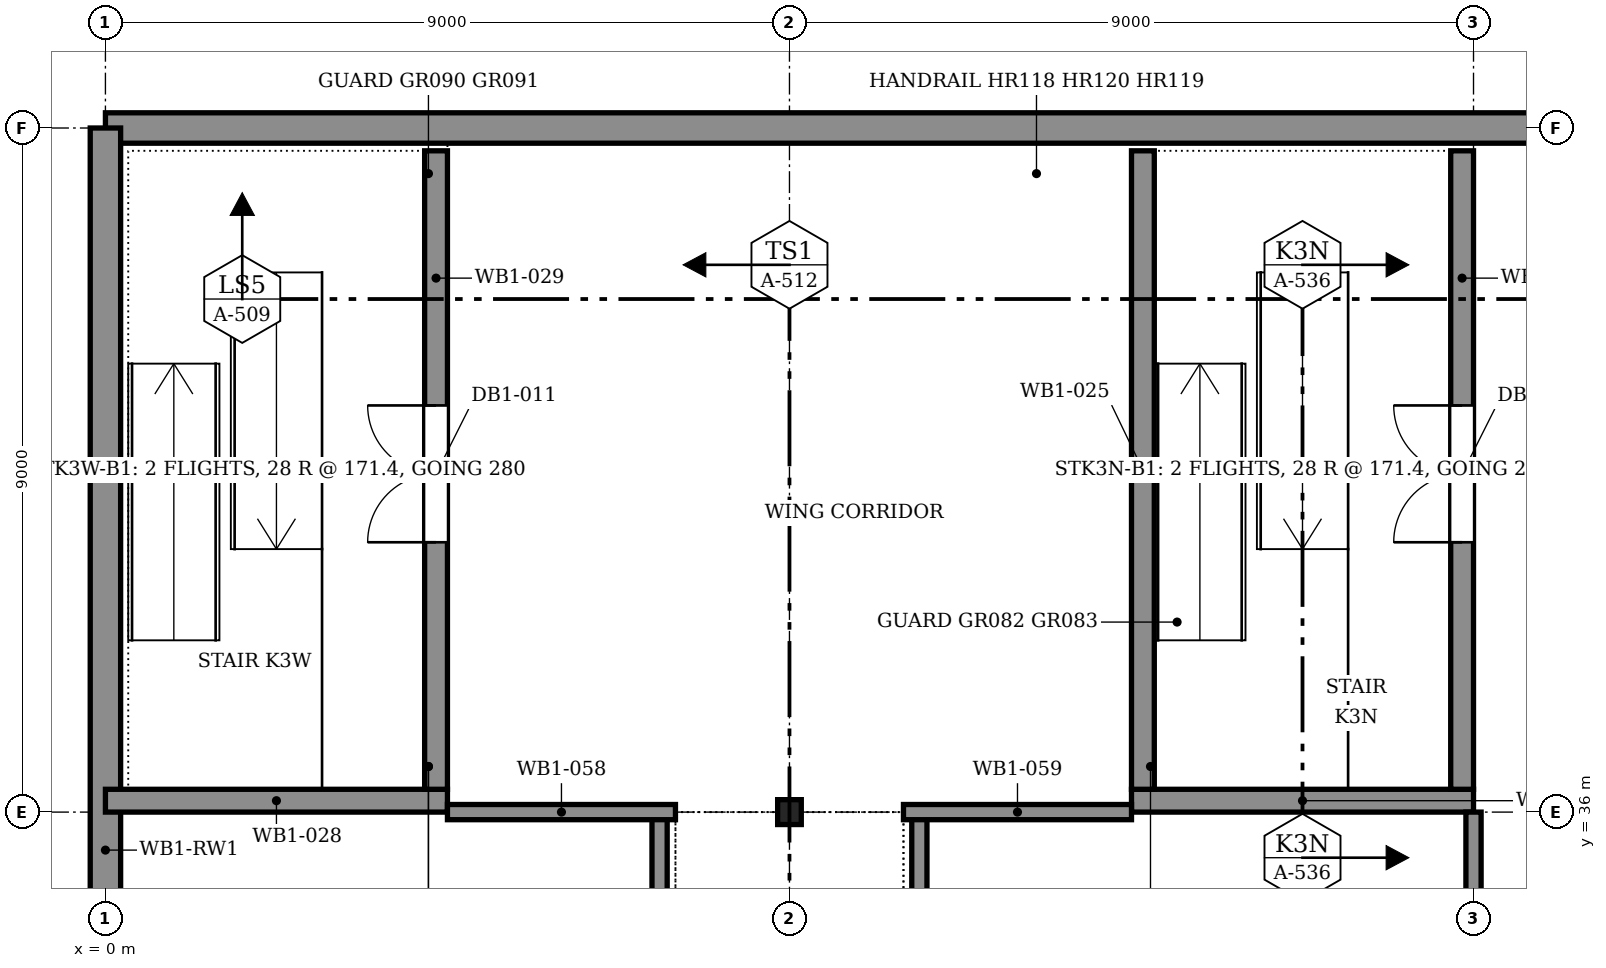
"""IFC4 building model, lengths in metres.
Left out: names, types, materials, properties, quantities, classifications, styles, units other than length and angle.
Written with IfcOpenShell. Run it as: python <this file> out.ifc"""

import sys

from ifc_helpers import new_model, si_unit, direction, frame, frame_2d, origin, origin_2d, place, context, subcontext, project, spatial, rectangle, i_section, extrude, element, fill, save


model = new_model("IFC4")
c1 = context("Model", 3, precision=1e-05, world=origin(), true_north=direction((0.0, 1.0)))
c2 = subcontext(c1, "Body", "Model", "MODEL_VIEW")
j1 = project(units=[si_unit("LENGTHUNIT", "METRE"), si_unit("PLANEANGLEUNIT", "RADIAN")], contexts=[c1])
p1 = place(None, origin())
s1 = spatial("IfcSite", under=j1, at=p1, CompositionType="ELEMENT")
p2 = place(p1, origin())
s2 = spatial("IfcBuilding", under=s1, at=p2, CompositionType="ELEMENT")
p3 = place(p2, frame((0.0, 0.0, -4.8)))
s3 = spatial("IfcBuildingStorey", under=s2, at=p3, CompositionType="ELEMENT", Elevation=-4.8)
p4 = place(p3, frame((0.0, 45.0, 0.0), z_axis=(0.0, 0.0, 1.0), x_axis=(1.0, 0.0, 0.0)))
e1 = element("IfcWall", 1, at=p4, inside=s3, PredefinedType="SOLIDWALL", context=c2, shape_type="SweptSolid", body=[
    extrude(rectangle(XDim=72.0, YDim=0.4, at=frame_2d((36.0, 0.0))), origin(), (0.0, 0.0, 1.0), 4.8),
])
p5 = place(p3, frame((0.0, 0.0, 0.0), z_axis=(0.0, 0.0, 1.0), x_axis=(0.0, 1.0, 0.0)))
e2 = element("IfcWall", 2, at=p5, inside=s3, PredefinedType="SOLIDWALL", context=c2, shape_type="SweptSolid", body=[
    extrude(rectangle(XDim=45.0, YDim=0.4, at=frame_2d((22.5, 0.0))), origin(), (0.0, 0.0, 1.0), 4.8),
])
p6 = place(p3, frame((9.0, 36.0, 0.0), z_axis=(0.0, 0.0, 1.0), x_axis=(1.0, 0.0, 0.0)))
e3 = element("IfcColumn", 3, at=p6, inside=s3, PredefinedType="COLUMN", context=c2, shape_type="SweptSolid", body=[
    extrude(i_section(OverallWidth=0.311, OverallDepth=0.327, WebThickness=0.016, FlangeThickness=0.025, FilletRadius=0.017, at=origin_2d()), origin(), (0.0, 0.0, 1.0), 1.19),
])
p7 = place(p3, frame((13.5, 36.15, 0.0), z_axis=(0.0, 0.0, 1.0), x_axis=(1.0, 0.0, 0.0)))
e4 = element("IfcWall", 4, at=p7, inside=s3, PredefinedType="SOLIDWALL", context=c2, shape_type="SweptSolid", body=[
    extrude(rectangle(XDim=4.5, YDim=0.3, at=frame_2d((2.25, 0.0))), origin(), (0.0, 0.0, 1.0), 4.8),
])
p8 = place(p3, frame((17.85, 36.3, 0.0), z_axis=(0.0, 0.0, 1.0), x_axis=(0.0, 1.0, 0.0)))
e5 = element("IfcWall", 5, at=p8, inside=s3, PredefinedType="SOLIDWALL", context=c2, shape_type="SweptSolid", body=[
    extrude(rectangle(XDim=8.4, YDim=0.3, at=frame_2d((4.2, 0.0))), origin(), (0.0, 0.0, 1.0), 4.8),
])
p9 = place(p8, frame((3.25, 0.0, 0.0)))
e6 = element("IfcOpeningElement", 6, at=p9, cuts=e5, PredefinedType="OPENING", context=c2, shape_type="SweptSolid", body=[
    extrude(rectangle(XDim=1.8, YDim=2.1, at=frame_2d((0.9, 1.05))), frame((0.0, 0.16, 0.0), z_axis=(0.0, -1.0, 0.0), x_axis=(1.0, 0.0, 0.0)), (0.0, 0.0, 1.0), 0.32),
])
p10 = place(p3, frame((13.65, 36.3, 0.0), z_axis=(0.0, 0.0, 1.0), x_axis=(0.0, 1.0, 0.0)))
e7 = element("IfcWall", 7, at=p10, inside=s3, PredefinedType="SOLIDWALL", context=c2, shape_type="SweptSolid", body=[
    extrude(rectangle(XDim=8.4, YDim=0.3, at=frame_2d((4.2, 0.0))), origin(), (0.0, 0.0, 1.0), 4.8),
])
p11 = place(p3, frame((0.0, 36.15, 0.0), z_axis=(0.0, 0.0, 1.0), x_axis=(1.0, 0.0, 0.0)))
e8 = element("IfcWall", 8, at=p11, inside=s3, PredefinedType="SOLIDWALL", context=c2, shape_type="SweptSolid", body=[
    extrude(rectangle(XDim=4.5, YDim=0.3, at=frame_2d((2.25, 0.0))), origin(), (0.0, 0.0, 1.0), 4.8),
])
p12 = place(p3, frame((4.35, 36.3, 0.0), z_axis=(0.0, 0.0, 1.0), x_axis=(0.0, 1.0, 0.0)))
e9 = element("IfcWall", 9, at=p12, inside=s3, PredefinedType="SOLIDWALL", context=c2, shape_type="SweptSolid", body=[
    extrude(rectangle(XDim=8.4, YDim=0.3, at=frame_2d((4.2, 0.0))), origin(), (0.0, 0.0, 1.0), 4.8),
])
p13 = place(p12, frame((3.25, 0.0, 0.0)))
e10 = element("IfcOpeningElement", 10, at=p13, cuts=e9, PredefinedType="OPENING", context=c2, shape_type="SweptSolid", body=[
    extrude(rectangle(XDim=1.8, YDim=2.1, at=frame_2d((0.9, 1.05))), frame((0.0, 0.16, 0.0), z_axis=(0.0, -1.0, 0.0), x_axis=(1.0, 0.0, 0.0)), (0.0, 0.0, 1.0), 0.32),
])
p14 = place(p3, frame((7.291, 18.0, 0.0), z_axis=(0.0, 0.0, 1.0), x_axis=(0.0, 1.0, 0.0)))
e11 = element("IfcWall", 11, at=p14, inside=s3, PredefinedType="PARTITIONING", context=c2, shape_type="SweptSolid", body=[
    extrude(rectangle(XDim=18.0, YDim=0.2, at=frame_2d((9.0, 0.0))), origin(), (0.0, 0.0, 1.0), 2.6),
])
p15 = place(p14, frame((8.51, 0.0, 0.0)))
e12 = element("IfcOpeningElement", 12, at=p15, cuts=e11, PredefinedType="OPENING", context=c2, shape_type="SweptSolid", body=[
    extrude(rectangle(XDim=1.0, YDim=2.1, at=frame_2d((0.5, 1.05))), frame((0.0, 0.11, 0.0), z_axis=(0.0, -1.0, 0.0), x_axis=(1.0, 0.0, 0.0)), (0.0, 0.0, 1.0), 0.22),
])
p16 = place(p3, frame((10.709, 18.0, 0.0), z_axis=(0.0, 0.0, 1.0), x_axis=(0.0, 1.0, 0.0)))
e13 = element("IfcWall", 13, at=p16, inside=s3, PredefinedType="PARTITIONING", context=c2, shape_type="SweptSolid", body=[
    extrude(rectangle(XDim=18.0, YDim=0.2, at=frame_2d((9.0, 0.0))), origin(), (0.0, 0.0, 1.0), 2.6),
])
p17 = place(p16, frame((8.51, 0.0, 0.0)))
e14 = element("IfcOpeningElement", 14, at=p17, cuts=e13, PredefinedType="OPENING", context=c2, shape_type="SweptSolid", body=[
    extrude(rectangle(XDim=1.0, YDim=2.1, at=frame_2d((0.5, 1.05))), frame((0.0, 0.11, 0.0), z_axis=(0.0, -1.0, 0.0), x_axis=(1.0, 0.0, 0.0)), (0.0, 0.0, 1.0), 0.22),
])
for number, where, z_axis, x_axis in (
    (15, (4.5, 36.0, 0.0), (0.0, 0.0, 1.0), (1.0, 0.0, 0.0)),
    (16, (10.5, 36.0, 0.0), (0.0, 0.0, 1.0), (1.0, 0.0, 0.0)),
):
    element("IfcWall", number, at=place(p3, frame(where, z_axis=z_axis, x_axis=x_axis)), inside=s3, PredefinedType="PARTITIONING", context=c2, shape_type="SweptSolid", body=[
        extrude(rectangle(XDim=3.0, YDim=0.2, at=frame_2d((1.5, 0.0))), origin(), (0.0, 0.0, 1.0), 2.6),
    ])
p18 = place(p3, frame((18.0, 27.127, 0.0), z_axis=(0.0, 0.0, 1.0), x_axis=(0.0, 1.0, 0.0)))
e17 = element("IfcWall", 17, at=p18, inside=s3, PredefinedType="PARTITIONING", context=c2, shape_type="SweptSolid", body=[
    extrude(rectangle(XDim=8.873, YDim=0.2, at=frame_2d((4.437, 0.0))), origin(), (0.0, 0.0, 1.0), 2.6),
])
p19 = place(p9, origin())
e18 = element("IfcDoor", 18, at=p19, inside=s3, OperationType="DOUBLE_DOOR_SINGLE_SWING", PredefinedType="DOOR", context=c2, shape_type="SweptSolid", body=[
    extrude(rectangle(XDim=1.8, YDim=2.1, at=frame_2d((0.9, 1.05))), frame((0.0, 0.025, 0.0), z_axis=(0.0, -1.0, 0.0), x_axis=(1.0, 0.0, 0.0)), (0.0, 0.0, 1.0), 0.05),
])
fill(e6, e18)
p20 = place(p13, origin())
e19 = element("IfcDoor", 19, at=p20, inside=s3, OperationType="DOUBLE_DOOR_SINGLE_SWING", PredefinedType="DOOR", context=c2, shape_type="SweptSolid", body=[
    extrude(rectangle(XDim=1.8, YDim=2.1, at=frame_2d((0.9, 1.05))), frame((0.0, 0.025, 0.0), z_axis=(0.0, -1.0, 0.0), x_axis=(1.0, 0.0, 0.0)), (0.0, 0.0, 1.0), 0.05),
])
fill(e10, e19)
save(model, sys.argv[1])
